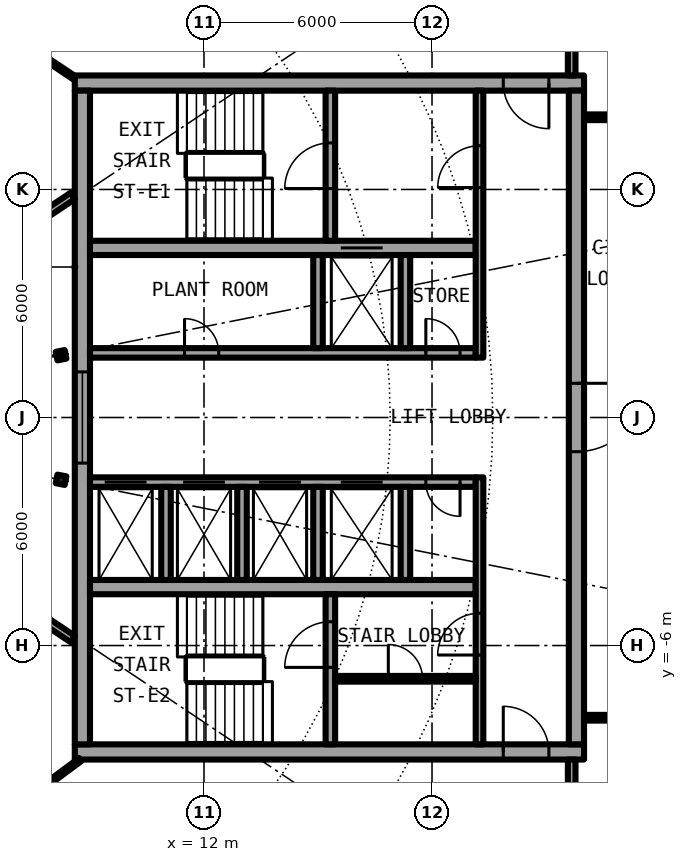
"""IFC4 building model, lengths in metres.
Left out: names, types, materials, properties, quantities, classifications, styles, units other than length and angle.
Written with IfcOpenShell. Run it as: python <this file> out.ifc"""

import sys

from ifc_helpers import new_model, si_unit, direction, frame, frame_2d, origin, origin_2d, place, context, subcontext, project, spatial, rectangle, i_section, extrude, element, fill, save


model = new_model("IFC4")
c1 = context("Model", 3, precision=1e-05, world=origin(), true_north=direction((0.0, 1.0)))
c2 = subcontext(c1, "Body", "Model", "MODEL_VIEW")
j1 = project(units=[si_unit("LENGTHUNIT", "METRE"), si_unit("PLANEANGLEUNIT", "RADIAN")], contexts=[c1])
p1 = place(None, origin())
s1 = spatial("IfcSite", under=j1, at=p1, CompositionType="ELEMENT")
p2 = place(p1, origin())
s2 = spatial("IfcBuilding", under=s1, at=p2, CompositionType="ELEMENT")
p3 = place(p2, frame((0.0, 0.0, 227.95)))
s3 = spatial("IfcBuildingStorey", under=s2, at=p3, CompositionType="ELEMENT", Elevation=227.95)
for number, where, z_axis, x_axis in (
    (1, (8.239, 1.639, 0.0), (0.0, 0.0, 1.0), (0.981, 0.195, 0.0)),
    (2, (8.239, -1.639, 0.0), (0.0, 0.0, 1.0), (0.981, -0.195, 0.0)),
):
    element("IfcColumn", number, at=place(p3, frame(where, z_axis=z_axis, x_axis=x_axis)), inside=s3, PredefinedType="COLUMN", context=c2, shape_type="SweptSolid", body=[
        extrude(i_section(OverallWidth=0.24, OverallDepth=0.23, WebThickness=0.008, FlangeThickness=0.012, FilletRadius=0.021, at=origin_2d()), origin(), (0.0, 0.0, 1.0), 3.05),
    ])
p4 = place(p3, frame((22.0, 8.8, 0.0), z_axis=(0.0, 0.0, 1.0), x_axis=(-1.0, 0.0, 0.0)))
e3 = element("IfcWall", 3, at=p4, inside=s3, PredefinedType="SHEAR", context=c2, shape_type="SweptSolid", body=[
    extrude(rectangle(XDim=13.4, YDim=0.4, at=frame_2d((6.7, 0.0))), origin(), (0.0, 0.0, 1.0), 3.05),
])
p5 = place(p4, frame((0.925, 0.0, 0.0)))
e4 = element("IfcOpeningElement", 4, at=p5, cuts=e3, PredefinedType="OPENING", context=c2, shape_type="SweptSolid", body=[
    extrude(rectangle(XDim=1.2, YDim=2.3, at=frame_2d((0.6, 1.15))), frame((0.0, 0.21, 0.0), z_axis=(0.0, -1.0, 0.0), x_axis=(1.0, 0.0, 0.0)), (0.0, 0.0, 1.0), 0.42),
])
p6 = place(p3, frame((8.6, -8.8, 0.0), z_axis=(0.0, 0.0, 1.0), x_axis=(1.0, 0.0, 0.0)))
e5 = element("IfcWall", 5, at=p6, inside=s3, PredefinedType="SHEAR", context=c2, shape_type="SweptSolid", body=[
    extrude(rectangle(XDim=13.4, YDim=0.4, at=frame_2d((6.7, 0.0))), origin(), (0.0, 0.0, 1.0), 3.05),
])
p7 = place(p6, frame((11.275, 0.0, 0.0)))
e6 = element("IfcOpeningElement", 6, at=p7, cuts=e5, PredefinedType="OPENING", context=c2, shape_type="SweptSolid", body=[
    extrude(rectangle(XDim=1.2, YDim=2.3, at=frame_2d((0.6, 1.15))), frame((0.0, 0.21, 0.0), z_axis=(0.0, -1.0, 0.0), x_axis=(1.0, 0.0, 0.0)), (0.0, 0.0, 1.0), 0.42),
])
p8 = place(p3, frame((21.8, 8.6, 0.0), z_axis=(0.0, 0.0, 1.0), x_axis=(0.0, -1.0, 0.0)))
e7 = element("IfcWall", 7, at=p8, inside=s3, PredefinedType="SHEAR", context=c2, shape_type="SweptSolid", body=[
    extrude(rectangle(XDim=17.2, YDim=0.4, at=frame_2d((8.6, 0.0))), origin(), (0.0, 0.0, 1.0), 3.05),
])
p9 = place(p8, frame((7.7, 0.0, 0.0)))
e8 = element("IfcOpeningElement", 8, at=p9, cuts=e7, PredefinedType="OPENING", context=c2, shape_type="SweptSolid", body=[
    extrude(rectangle(XDim=1.8, YDim=2.3, at=frame_2d((0.9, 1.15))), frame((0.0, 0.21, 0.0), z_axis=(0.0, -1.0, 0.0), x_axis=(1.0, 0.0, 0.0)), (0.0, 0.0, 1.0), 0.42),
])
p10 = place(p3, frame((8.8, -8.6, 0.0), z_axis=(0.0, 0.0, 1.0), x_axis=(0.0, 1.0, 0.0)))
e9 = element("IfcWall", 9, at=p10, inside=s3, PredefinedType="SHEAR", context=c2, shape_type="SweptSolid", body=[
    extrude(rectangle(XDim=17.2, YDim=0.4, at=frame_2d((8.6, 0.0))), origin(), (0.0, 0.0, 1.0), 3.05),
])
p11 = place(p10, frame((7.4, 0.0, 0.1)))
e10 = element("IfcOpeningElement", 10, at=p11, cuts=e9, PredefinedType="OPENING", context=c2, shape_type="SweptSolid", body=[
    extrude(rectangle(XDim=2.4, YDim=2.2, at=frame_2d((1.2, 1.1))), frame((0.0, 0.21, 0.0), z_axis=(0.0, -1.0, 0.0), x_axis=(1.0, 0.0, 0.0)), (0.0, 0.0, 1.0), 0.42),
])
p12 = place(p3, frame((9.0, 1.7, 0.0), z_axis=(0.0, 0.0, 1.0), x_axis=(1.0, 0.0, 0.0)))
e11 = element("IfcWall", 11, at=p12, inside=s3, PredefinedType="SHEAR", context=c2, shape_type="SweptSolid", body=[
    extrude(rectangle(XDim=10.15, YDim=0.25, at=frame_2d((5.075, 0.0))), origin(), (0.0, 0.0, 1.0), 3.05),
])
p13 = place(p12, frame((2.488, 0.0, 0.0)))
e12 = element("IfcOpeningElement", 12, at=p13, cuts=e11, PredefinedType="OPENING", context=c2, shape_type="SweptSolid", body=[
    extrude(rectangle(XDim=0.9, YDim=2.3, at=frame_2d((0.45, 1.15))), frame((0.0, 0.135, 0.0), z_axis=(0.0, -1.0, 0.0), x_axis=(1.0, 0.0, 0.0)), (0.0, 0.0, 1.0), 0.27),
])
p14 = place(p12, frame((8.837, 0.0, 0.0)))
e13 = element("IfcOpeningElement", 13, at=p14, cuts=e11, PredefinedType="OPENING", context=c2, shape_type="SweptSolid", body=[
    extrude(rectangle(XDim=0.9, YDim=2.3, at=frame_2d((0.45, 1.15))), frame((0.0, 0.135, 0.0), z_axis=(0.0, -1.0, 0.0), x_axis=(1.0, 0.0, 0.0)), (0.0, 0.0, 1.0), 0.27),
])
p15 = place(p3, frame((9.0, 4.462, 0.0), z_axis=(0.0, 0.0, 1.0), x_axis=(1.0, 0.0, 0.0)))
e14 = element("IfcWall", 14, at=p15, inside=s3, PredefinedType="SHEAR", context=c2, shape_type="SweptSolid", body=[
    extrude(rectangle(XDim=10.15, YDim=0.375, at=frame_2d((5.075, 0.0))), origin(), (0.0, 0.0, 1.0), 3.05),
])
p16 = place(p15, frame((6.6, 0.0, 0.0)))
e15 = element("IfcOpeningElement", 15, at=p16, cuts=e14, PredefinedType="OPENING", context=c2, shape_type="SweptSolid", body=[
    extrude(rectangle(XDim=1.1, YDim=2.3, at=frame_2d((0.55, 1.15))), frame((0.0, 0.198, 0.0), z_axis=(0.0, -1.0, 0.0), x_axis=(1.0, 0.0, 0.0)), (0.0, 0.0, 1.0), 0.395),
])
p17 = place(p3, frame((15.325, 4.65, 0.0), z_axis=(0.0, 0.0, 1.0), x_axis=(0.0, 1.0, 0.0)))
e16 = element("IfcWall", 16, at=p17, inside=s3, PredefinedType="SHEAR", context=c2, shape_type="SweptSolid", body=[
    extrude(rectangle(XDim=3.95, YDim=0.25, at=frame_2d((1.975, 0.0))), origin(), (0.0, 0.0, 1.0), 3.05),
])
p18 = place(p17, frame((1.375, 0.0, 0.0)))
e17 = element("IfcOpeningElement", 17, at=p18, cuts=e16, PredefinedType="OPENING", context=c2, shape_type="SweptSolid", body=[
    extrude(rectangle(XDim=1.2, YDim=2.3, at=frame_2d((0.6, 1.15))), frame((0.0, 0.135, 0.0), z_axis=(0.0, -1.0, 0.0), x_axis=(1.0, 0.0, 0.0)), (0.0, 0.0, 1.0), 0.27),
])
for number, where, z_axis, x_axis in (
    (18, (15.0, 1.825, 0.0), (0.0, 0.0, 1.0), (0.0, 1.0, 0.0)),
    (19, (17.3, 1.825, 0.0), (0.0, 0.0, 1.0), (0.0, 1.0, 0.0)),
):
    element("IfcWall", number, at=place(p3, frame(where, z_axis=z_axis, x_axis=x_axis)), inside=s3, PredefinedType="SOLIDWALL", context=c2, shape_type="SweptSolid", body=[
        extrude(rectangle(XDim=2.45, YDim=0.25, at=frame_2d((1.225, 0.0))), origin(), (0.0, 0.0, 1.0), 2.7),
    ])
p19 = place(p3, frame((19.25, 1.575, 0.0), z_axis=(0.0, 0.0, 1.0), x_axis=(0.0, 1.0, 0.0)))
e20 = element("IfcWall", 20, at=p19, inside=s3, PredefinedType="SOLIDWALL", context=c2, shape_type="SweptSolid", body=[
    extrude(rectangle(XDim=7.025, YDim=0.2, at=frame_2d((3.513, 0.0))), origin(), (0.0, 0.0, 1.0), 2.7),
])
p20 = place(p19, frame((4.475, 0.0, 0.0)))
e21 = element("IfcOpeningElement", 21, at=p20, cuts=e20, PredefinedType="OPENING", context=c2, shape_type="SweptSolid", body=[
    extrude(rectangle(XDim=1.1, YDim=2.3, at=frame_2d((0.55, 1.15))), frame((0.0, 0.11, 0.0), z_axis=(0.0, -1.0, 0.0), x_axis=(1.0, 0.0, 0.0)), (0.0, 0.0, 1.0), 0.22),
])
p21 = place(p3, frame((19.15, -1.7, 0.0), z_axis=(0.0, 0.0, 1.0), x_axis=(-1.0, 0.0, 0.0)))
e22 = element("IfcWall", 22, at=p21, inside=s3, PredefinedType="SHEAR", context=c2, shape_type="SweptSolid", body=[
    extrude(rectangle(XDim=10.15, YDim=0.25, at=frame_2d((5.075, 0.0))), origin(), (0.0, 0.0, 1.0), 3.05),
])
p22 = place(p21, frame((8.663, 0.0, 0.0)))
e23 = element("IfcOpeningElement", 23, at=p22, cuts=e22, PredefinedType="OPENING", context=c2, shape_type="SweptSolid", body=[
    extrude(rectangle(XDim=1.1, YDim=2.3, at=frame_2d((0.55, 1.15))), frame((0.0, 0.135, 0.0), z_axis=(0.0, -1.0, 0.0), x_axis=(1.0, 0.0, 0.0)), (0.0, 0.0, 1.0), 0.27),
])
p23 = place(p21, frame((6.6, 0.0, 0.0)))
e24 = element("IfcOpeningElement", 24, at=p23, cuts=e22, PredefinedType="OPENING", context=c2, shape_type="SweptSolid", body=[
    extrude(rectangle(XDim=1.1, YDim=2.3, at=frame_2d((0.55, 1.15))), frame((0.0, 0.135, 0.0), z_axis=(0.0, -1.0, 0.0), x_axis=(1.0, 0.0, 0.0)), (0.0, 0.0, 1.0), 0.27),
])
p24 = place(p21, frame((4.6, 0.0, 0.0)))
e25 = element("IfcOpeningElement", 25, at=p24, cuts=e22, PredefinedType="OPENING", context=c2, shape_type="SweptSolid", body=[
    extrude(rectangle(XDim=1.1, YDim=2.3, at=frame_2d((0.55, 1.15))), frame((0.0, 0.135, 0.0), z_axis=(0.0, -1.0, 0.0), x_axis=(1.0, 0.0, 0.0)), (0.0, 0.0, 1.0), 0.27),
])
p25 = place(p21, frame((2.45, 0.0, 0.0)))
e26 = element("IfcOpeningElement", 26, at=p25, cuts=e22, PredefinedType="OPENING", context=c2, shape_type="SweptSolid", body=[
    extrude(rectangle(XDim=1.1, YDim=2.3, at=frame_2d((0.55, 1.15))), frame((0.0, 0.135, 0.0), z_axis=(0.0, -1.0, 0.0), x_axis=(1.0, 0.0, 0.0)), (0.0, 0.0, 1.0), 0.27),
])
p26 = place(p21, frame((0.413, 0.0, 0.0)))
e27 = element("IfcOpeningElement", 27, at=p26, cuts=e22, PredefinedType="OPENING", context=c2, shape_type="SweptSolid", body=[
    extrude(rectangle(XDim=0.9, YDim=2.3, at=frame_2d((0.45, 1.15))), frame((0.0, 0.135, 0.0), z_axis=(0.0, -1.0, 0.0), x_axis=(1.0, 0.0, 0.0)), (0.0, 0.0, 1.0), 0.27),
])
p27 = place(p3, frame((9.0, -4.462, 0.0), z_axis=(0.0, 0.0, 1.0), x_axis=(1.0, 0.0, 0.0)))
e28 = element("IfcWall", 28, at=p27, inside=s3, PredefinedType="SHEAR", context=c2, shape_type="SweptSolid", body=[
    extrude(rectangle(XDim=10.15, YDim=0.375, at=frame_2d((5.075, 0.0))), origin(), (0.0, 0.0, 1.0), 3.05),
])
p28 = place(p3, frame((15.325, -8.6, 0.0), z_axis=(0.0, 0.0, 1.0), x_axis=(0.0, 1.0, 0.0)))
e29 = element("IfcWall", 29, at=p28, inside=s3, PredefinedType="SHEAR", context=c2, shape_type="SweptSolid", body=[
    extrude(rectangle(XDim=3.95, YDim=0.25, at=frame_2d((1.975, 0.0))), origin(), (0.0, 0.0, 1.0), 3.05),
])
p29 = place(p28, frame((2.025, 0.0, 0.0)))
e30 = element("IfcOpeningElement", 30, at=p29, cuts=e29, PredefinedType="OPENING", context=c2, shape_type="SweptSolid", body=[
    extrude(rectangle(XDim=1.2, YDim=2.3, at=frame_2d((0.6, 1.15))), frame((0.0, 0.135, 0.0), z_axis=(0.0, -1.0, 0.0), x_axis=(1.0, 0.0, 0.0)), (0.0, 0.0, 1.0), 0.27),
])
for number, where, z_axis, x_axis in (
    (31, (15.0, -1.825, 0.0), (0.0, 0.0, 1.0), (0.0, -1.0, 0.0)),
    (32, (17.3, -1.825, 0.0), (0.0, 0.0, 1.0), (0.0, -1.0, 0.0)),
):
    element("IfcWall", number, at=place(p3, frame(where, z_axis=z_axis, x_axis=x_axis)), inside=s3, PredefinedType="SOLIDWALL", context=c2, shape_type="SweptSolid", body=[
        extrude(rectangle(XDim=2.45, YDim=0.25, at=frame_2d((1.225, 0.0))), origin(), (0.0, 0.0, 1.0), 2.7),
    ])
p30 = place(p3, frame((19.25, -8.6, 0.0), z_axis=(0.0, 0.0, 1.0), x_axis=(0.0, 1.0, 0.0)))
e33 = element("IfcWall", 33, at=p30, inside=s3, PredefinedType="SOLIDWALL", context=c2, shape_type="SweptSolid", body=[
    extrude(rectangle(XDim=7.025, YDim=0.2, at=frame_2d((3.513, 0.0))), origin(), (0.0, 0.0, 1.0), 2.7),
])
p31 = place(p30, frame((2.35, 0.0, 0.0)))
e34 = element("IfcOpeningElement", 34, at=p31, cuts=e33, PredefinedType="OPENING", context=c2, shape_type="SweptSolid", body=[
    extrude(rectangle(XDim=1.1, YDim=2.3, at=frame_2d((0.55, 1.15))), frame((0.0, 0.11, 0.0), z_axis=(0.0, -1.0, 0.0), x_axis=(1.0, 0.0, 0.0)), (0.0, 0.0, 1.0), 0.22),
])
for number, where, z_axis, x_axis in (
    (35, (11.0, -1.825, 0.0), (0.0, 0.0, 1.0), (0.0, -1.0, 0.0)),
    (36, (13.0, -1.825, 0.0), (0.0, 0.0, 1.0), (0.0, -1.0, 0.0)),
):
    element("IfcWall", number, at=place(p3, frame(where, z_axis=z_axis, x_axis=x_axis)), inside=s3, PredefinedType="SOLIDWALL", context=c2, shape_type="SweptSolid", body=[
        extrude(rectangle(XDim=2.45, YDim=0.25, at=frame_2d((1.225, 0.0))), origin(), (0.0, 0.0, 1.0), 2.7),
    ])
p32 = place(p3, frame((15.45, -6.875, 0.0), z_axis=(0.0, 0.0, 1.0), x_axis=(1.0, 0.0, 0.0)))
e37 = element("IfcWall", 37, at=p32, inside=s3, PredefinedType="PARTITIONING", context=c2, shape_type="SweptSolid", body=[
    extrude(rectangle(XDim=3.7, YDim=0.15, at=frame_2d((1.85, 0.0))), origin(), (0.0, 0.0, 1.0), 2.7),
])
p33 = place(p32, frame((1.4, 0.0, 0.0)))
e38 = element("IfcOpeningElement", 38, at=p33, cuts=e37, PredefinedType="OPENING", context=c2, shape_type="SweptSolid", body=[
    extrude(rectangle(XDim=0.9, YDim=2.3, at=frame_2d((0.45, 1.15))), frame((0.0, 0.085, 0.0), z_axis=(0.0, -1.0, 0.0), x_axis=(1.0, 0.0, 0.0)), (0.0, 0.0, 1.0), 0.17),
])
for number, where, z_axis, x_axis in (
    (39, (22.0, -7.9, 0.0), (0.0, 0.0, 1.0), (1.0, 0.0, 0.0)),
    (40, (22.0, 7.9, 0.0), (0.0, 0.0, 1.0), (1.0, 0.0, 0.0)),
):
    element("IfcWall", number, at=place(p3, frame(where, z_axis=z_axis, x_axis=x_axis)), inside=s3, PredefinedType="PARTITIONING", context=c2, shape_type="SweptSolid", body=[
        extrude(rectangle(XDim=2.94, YDim=0.15, at=frame_2d((1.47, 0.0))), origin(), (0.0, 0.0, 1.0), 2.7),
    ])
for number, where, z_axis, x_axis in (
    (41, (21.675, -10.8, 0.0), (0.0, 0.0, 1.0), (0.0, 1.0, 0.0)),
    (42, (21.675, 9.0, 0.0), (0.0, 0.0, 1.0), (0.0, 1.0, 0.0)),
):
    element("IfcWall", number, at=place(p3, frame(where, z_axis=z_axis, x_axis=x_axis)), inside=s3, PredefinedType="PARTITIONING", context=c2, shape_type="SweptSolid", body=[
        extrude(rectangle(XDim=1.8, YDim=0.2, at=frame_2d((0.9, 0.0))), origin(), (0.0, 0.0, 1.0), 2.7),
    ])
p34 = place(p3, frame((7.919, -9.611, 0.0), z_axis=(0.0, 0.0, 1.0), x_axis=(0.80321556998, 0.595688465677, 0.0)))
e43 = element("IfcWall", 43, at=p34, inside=s3, PredefinedType="PARTITIONING", context=c2, shape_type="SweptSolid", body=[
    extrude(rectangle(XDim=1.026, YDim=0.1, at=frame_2d((0.513, 0.0))), origin(), (0.0, 0.0, 1.0), 2.7),
])
p35 = place(p3, frame((6.513, -4.472, 0.0), z_axis=(0.0, 0.0, 1.0), x_axis=(0.831450132577, -0.555599385382, 0.0)))
e44 = element("IfcWall", 44, at=p35, inside=s3, PredefinedType="PARTITIONING", context=c2, shape_type="SweptSolid", body=[
    extrude(rectangle(XDim=2.443, YDim=0.2, at=frame_2d((1.221, 0.0))), origin(), (0.0, 0.0, 1.0), 2.7),
])
p36 = place(p3, frame((4.908, -5.959, 0.0), z_axis=(0.0, 0.0, 1.0), x_axis=(0.636115614725, -0.771593756262, 0.0)))
e45 = element("IfcWall", 45, at=p36, inside=s3, PredefinedType="PARTITIONING", context=c2, shape_type="SweptSolid", body=[
    extrude(rectangle(XDim=8.967, YDim=0.1, at=frame_2d((4.483, 0.0))), origin(), (0.0, 0.0, 1.0), 2.7),
])
p37 = place(p36, frame((6.4, 0.0, 0.0)))
e46 = element("IfcOpeningElement", 46, at=p37, cuts=e45, PredefinedType="OPENING", context=c2, shape_type="SweptSolid", body=[
    extrude(rectangle(XDim=0.9, YDim=2.3, at=frame_2d((0.45, 1.15))), frame((0.0, 0.06, 0.0), z_axis=(0.0, -1.0, 0.0), x_axis=(1.0, 0.0, 0.0)), (0.0, 0.0, 1.0), 0.12),
])
p38 = place(p36, frame((1.917, 0.0, 0.0)))
e47 = element("IfcOpeningElement", 47, at=p38, cuts=e45, PredefinedType="OPENING", context=c2, shape_type="SweptSolid", body=[
    extrude(rectangle(XDim=0.9, YDim=2.3, at=frame_2d((0.45, 1.15))), frame((0.0, 0.06, 0.0), z_axis=(0.0, -1.0, 0.0), x_axis=(1.0, 0.0, 0.0)), (0.0, 0.0, 1.0), 0.12),
])
p39 = place(p3, frame((6.513, 4.472, 0.0), z_axis=(0.0, 0.0, 1.0), x_axis=(0.831450132577, 0.555599385382, 0.0)))
e48 = element("IfcWall", 48, at=p39, inside=s3, PredefinedType="PARTITIONING", context=c2, shape_type="SweptSolid", body=[
    extrude(rectangle(XDim=2.443, YDim=0.2, at=frame_2d((1.221, 0.0))), origin(), (0.0, 0.0, 1.0), 2.7),
])
p40 = place(p3, frame((5.73, 10.848, 0.0), z_axis=(0.0, 0.0, 1.0), x_axis=(0.831397130511, -0.555678694372, 0.0)))
e49 = element("IfcWall", 49, at=p40, inside=s3, PredefinedType="PARTITIONING", context=c2, shape_type="SweptSolid", body=[
    extrude(rectangle(XDim=3.453, YDim=0.1, at=frame_2d((1.727, 0.0))), origin(), (0.0, 0.0, 1.0), 2.7),
])
p41 = place(p16, origin())
e50 = element("IfcDoor", 50, at=p41, inside=s3, OperationType="DOUBLE_DOOR_SLIDING", PredefinedType="DOOR", context=c2, shape_type="SweptSolid", body=[
    extrude(rectangle(XDim=1.1, YDim=2.3, at=frame_2d((0.55, 1.15))), frame((0.0, 0.025, 0.0), z_axis=(0.0, -1.0, 0.0), x_axis=(1.0, 0.0, 0.0)), (0.0, 0.0, 1.0), 0.05),
])
fill(e15, e50)
p42 = place(p22, origin())
e51 = element("IfcDoor", 51, at=p42, inside=s3, OperationType="DOUBLE_DOOR_SLIDING", PredefinedType="DOOR", context=c2, shape_type="SweptSolid", body=[
    extrude(rectangle(XDim=1.1, YDim=2.3, at=frame_2d((0.55, 1.15))), frame((0.0, 0.025, 0.0), z_axis=(0.0, -1.0, 0.0), x_axis=(1.0, 0.0, 0.0)), (0.0, 0.0, 1.0), 0.05),
])
fill(e23, e51)
p43 = place(p23, origin())
e52 = element("IfcDoor", 52, at=p43, inside=s3, OperationType="DOUBLE_DOOR_SLIDING", PredefinedType="DOOR", context=c2, shape_type="SweptSolid", body=[
    extrude(rectangle(XDim=1.1, YDim=2.3, at=frame_2d((0.55, 1.15))), frame((0.0, 0.025, 0.0), z_axis=(0.0, -1.0, 0.0), x_axis=(1.0, 0.0, 0.0)), (0.0, 0.0, 1.0), 0.05),
])
fill(e24, e52)
p44 = place(p24, origin())
e53 = element("IfcDoor", 53, at=p44, inside=s3, OperationType="DOUBLE_DOOR_SLIDING", PredefinedType="DOOR", context=c2, shape_type="SweptSolid", body=[
    extrude(rectangle(XDim=1.1, YDim=2.3, at=frame_2d((0.55, 1.15))), frame((0.0, 0.025, 0.0), z_axis=(0.0, -1.0, 0.0), x_axis=(1.0, 0.0, 0.0)), (0.0, 0.0, 1.0), 0.05),
])
fill(e25, e53)
p45 = place(p25, origin())
e54 = element("IfcDoor", 54, at=p45, inside=s3, OperationType="DOUBLE_DOOR_SLIDING", PredefinedType="DOOR", context=c2, shape_type="SweptSolid", body=[
    extrude(rectangle(XDim=1.1, YDim=2.3, at=frame_2d((0.55, 1.15))), frame((0.0, 0.025, 0.0), z_axis=(0.0, -1.0, 0.0), x_axis=(1.0, 0.0, 0.0)), (0.0, 0.0, 1.0), 0.05),
])
fill(e26, e54)
p46 = place(p13, origin())
e55 = element("IfcDoor", 55, at=p46, inside=s3, OperationType="SINGLE_SWING_RIGHT", PredefinedType="DOOR", context=c2, shape_type="SweptSolid", body=[
    extrude(rectangle(XDim=0.9, YDim=2.3, at=frame_2d((0.45, 1.15))), frame((0.0, 0.025, 0.0), z_axis=(0.0, -1.0, 0.0), x_axis=(1.0, 0.0, 0.0)), (0.0, 0.0, 1.0), 0.05),
])
fill(e12, e55)
p47 = place(p14, origin())
e56 = element("IfcDoor", 56, at=p47, inside=s3, OperationType="SINGLE_SWING_LEFT", PredefinedType="DOOR", context=c2, shape_type="SweptSolid", body=[
    extrude(rectangle(XDim=0.9, YDim=2.3, at=frame_2d((0.45, 1.15))), frame((0.0, 0.025, 0.0), z_axis=(0.0, -1.0, 0.0), x_axis=(1.0, 0.0, 0.0)), (0.0, 0.0, 1.0), 0.05),
])
fill(e13, e56)
p48 = place(p26, origin())
e57 = element("IfcDoor", 57, at=p48, inside=s3, OperationType="SINGLE_SWING_RIGHT", PredefinedType="DOOR", context=c2, shape_type="SweptSolid", body=[
    extrude(rectangle(XDim=0.9, YDim=2.3, at=frame_2d((0.45, 1.15))), frame((0.0, 0.025, 0.0), z_axis=(0.0, -1.0, 0.0), x_axis=(1.0, 0.0, 0.0)), (0.0, 0.0, 1.0), 0.05),
])
fill(e27, e57)
p49 = place(p33, origin())
e58 = element("IfcDoor", 58, at=p49, inside=s3, OperationType="SINGLE_SWING_LEFT", PredefinedType="DOOR", context=c2, shape_type="SweptSolid", body=[
    extrude(rectangle(XDim=0.9, YDim=2.3, at=frame_2d((0.45, 1.15))), frame((0.0, 0.025, 0.0), z_axis=(0.0, -1.0, 0.0), x_axis=(1.0, 0.0, 0.0)), (0.0, 0.0, 1.0), 0.05),
])
fill(e38, e58)
p50 = place(p18, origin())
e59 = element("IfcDoor", 59, at=p50, inside=s3, OperationType="SINGLE_SWING_LEFT", PredefinedType="DOOR", context=c2, shape_type="SweptSolid", body=[
    extrude(rectangle(XDim=1.2, YDim=2.3, at=frame_2d((0.6, 1.15))), frame((0.0, 0.025, 0.0), z_axis=(0.0, -1.0, 0.0), x_axis=(1.0, 0.0, 0.0)), (0.0, 0.0, 1.0), 0.05),
])
fill(e17, e59)
p51 = place(p29, origin())
e60 = element("IfcDoor", 60, at=p51, inside=s3, OperationType="SINGLE_SWING_LEFT", PredefinedType="DOOR", context=c2, shape_type="SweptSolid", body=[
    extrude(rectangle(XDim=1.2, YDim=2.3, at=frame_2d((0.6, 1.15))), frame((0.0, 0.025, 0.0), z_axis=(0.0, -1.0, 0.0), x_axis=(1.0, 0.0, 0.0)), (0.0, 0.0, 1.0), 0.05),
])
fill(e30, e60)
p52 = place(p20, origin())
e61 = element("IfcDoor", 61, at=p52, inside=s3, OperationType="SINGLE_SWING_LEFT", PredefinedType="DOOR", context=c2, shape_type="SweptSolid", body=[
    extrude(rectangle(XDim=1.1, YDim=2.3, at=frame_2d((0.55, 1.15))), frame((0.0, 0.025, 0.0), z_axis=(0.0, -1.0, 0.0), x_axis=(1.0, 0.0, 0.0)), (0.0, 0.0, 1.0), 0.05),
])
fill(e21, e61)
p53 = place(p31, origin())
e62 = element("IfcDoor", 62, at=p53, inside=s3, OperationType="SINGLE_SWING_RIGHT", PredefinedType="DOOR", context=c2, shape_type="SweptSolid", body=[
    extrude(rectangle(XDim=1.1, YDim=2.3, at=frame_2d((0.55, 1.15))), frame((0.0, 0.025, 0.0), z_axis=(0.0, -1.0, 0.0), x_axis=(1.0, 0.0, 0.0)), (0.0, 0.0, 1.0), 0.05),
])
fill(e34, e62)
p54 = place(p5, origin())
e63 = element("IfcDoor", 63, at=p54, inside=s3, OperationType="SINGLE_SWING_RIGHT", PredefinedType="DOOR", context=c2, shape_type="SweptSolid", body=[
    extrude(rectangle(XDim=1.2, YDim=2.3, at=frame_2d((0.6, 1.15))), frame((0.0, 0.025, 0.0), z_axis=(0.0, -1.0, 0.0), x_axis=(1.0, 0.0, 0.0)), (0.0, 0.0, 1.0), 0.05),
])
fill(e4, e63)
p55 = place(p7, origin())
e64 = element("IfcDoor", 64, at=p55, inside=s3, OperationType="SINGLE_SWING_LEFT", PredefinedType="DOOR", context=c2, shape_type="SweptSolid", body=[
    extrude(rectangle(XDim=1.2, YDim=2.3, at=frame_2d((0.6, 1.15))), frame((0.0, 0.025, 0.0), z_axis=(0.0, -1.0, 0.0), x_axis=(1.0, 0.0, 0.0)), (0.0, 0.0, 1.0), 0.05),
])
fill(e6, e64)
p56 = place(p9, origin())
e65 = element("IfcDoor", 65, at=p56, inside=s3, OperationType="SINGLE_SWING_LEFT", PredefinedType="DOOR", context=c2, shape_type="SweptSolid", body=[
    extrude(rectangle(XDim=1.8, YDim=2.3, at=frame_2d((0.9, 1.15))), frame((0.0, 0.025, 0.0), z_axis=(0.0, -1.0, 0.0), x_axis=(1.0, 0.0, 0.0)), (0.0, 0.0, 1.0), 0.05),
])
fill(e8, e65)
p57 = place(p11, origin())
e66 = element("IfcWindow", 66, at=p57, inside=s3, PartitioningType="SINGLE_PANEL", PredefinedType="WINDOW", context=c2, shape_type="SweptSolid", body=[
    extrude(rectangle(XDim=2.4, YDim=2.2, at=frame_2d((1.2, 1.1))), frame((0.0, 0.03, 0.0), z_axis=(0.0, -1.0, 0.0), x_axis=(1.0, 0.0, 0.0)), (0.0, 0.0, 1.0), 0.06),
])
fill(e10, e66)
save(model, sys.argv[1])
